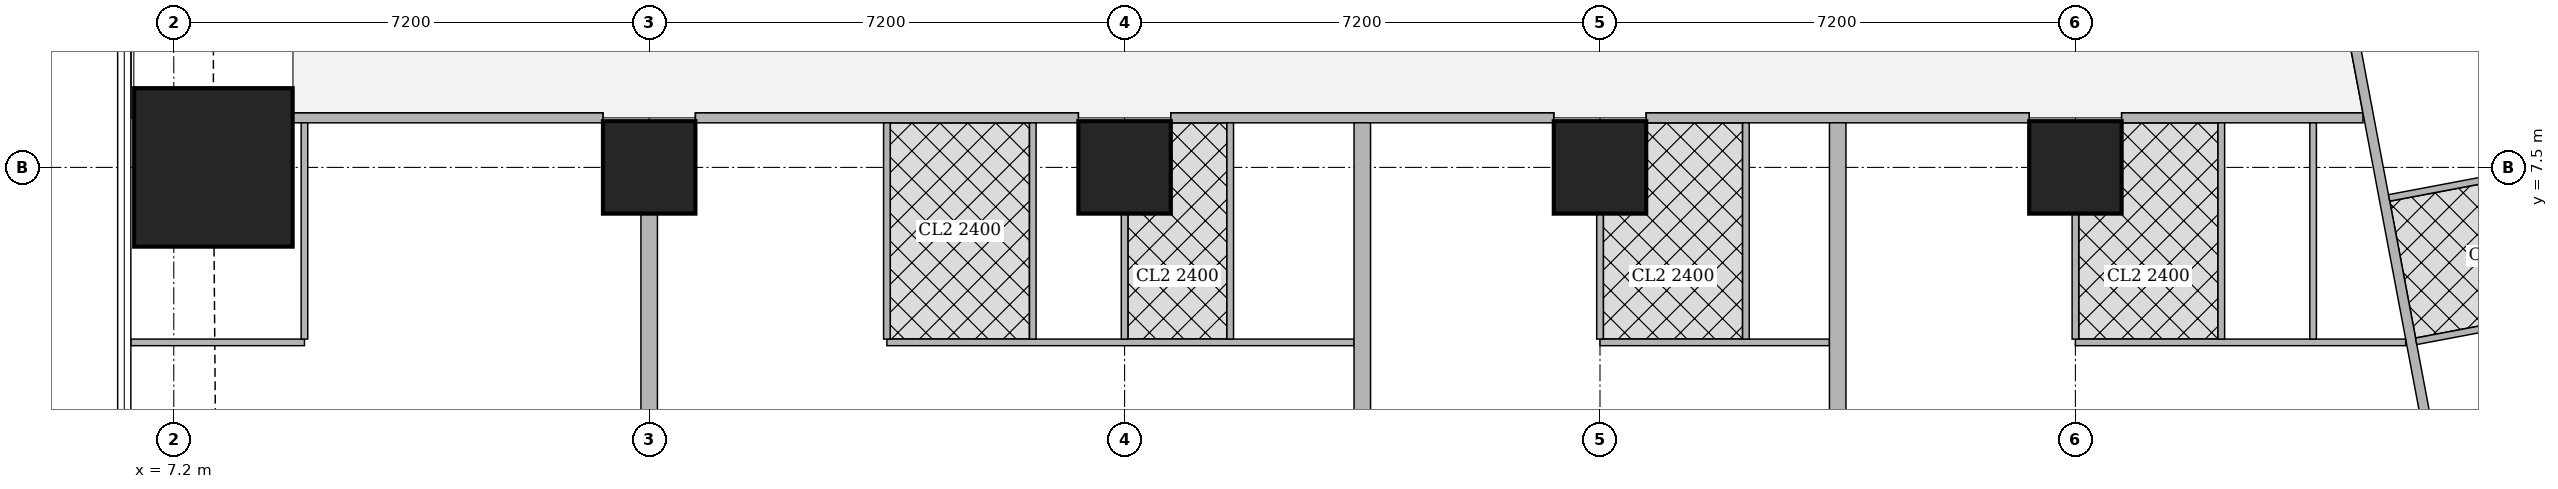
"""IFC4 building model, lengths in metres.
Left out: names, types, materials, properties, quantities, classifications, styles, units other than length and angle.
Written with IfcOpenShell. Run it as: python <this file> out.ifc"""

import sys

from ifc_helpers import new_model, si_unit, direction, frame, frame_2d, origin, origin_2d, place, context, subcontext, project, spatial, rectangle, extrude, element, fill, save


model = new_model("IFC4")
c1 = context("Model", 3, precision=1e-05, world=origin(), true_north=direction((0.0, 1.0)))
c2 = subcontext(c1, "Body", "Model", "MODEL_VIEW")
j1 = project(units=[si_unit("LENGTHUNIT", "METRE"), si_unit("PLANEANGLEUNIT", "RADIAN")], contexts=[c1])
p1 = place(None, origin())
s1 = spatial("IfcSite", under=j1, at=p1, CompositionType="ELEMENT")
p2 = place(p1, origin())
s2 = spatial("IfcBuilding", under=s1, at=p2, CompositionType="ELEMENT")
p3 = place(p2, frame((0.0, 0.0, 216.2)))
s3 = spatial("IfcBuildingStorey", under=s2, at=p3, CompositionType="ELEMENT", Elevation=216.2)
p4 = place(p3, frame((7.8, 7.5, 0.0), z_axis=(0.0, 0.0, 1.0), x_axis=(1.0, 0.0, 0.0)))
e1 = element("IfcColumn", 1, at=p4, inside=s3, PredefinedType="COLUMN", context=c2, shape_type="SweptSolid", body=[
    extrude(rectangle(XDim=2.4, YDim=2.4, at=origin_2d()), origin(), (0.0, 0.0, 1.0), 3.75),
])
for number, where, z_axis, x_axis in (
    (2, (14.4, 7.5, 0.0), (0.0, 0.0, 1.0), (1.0, 0.0, 0.0)),
    (3, (21.6, 7.5, 0.0), (0.0, 0.0, 1.0), (1.0, 0.0, 0.0)),
    (4, (28.8, 7.5, 0.0), (0.0, 0.0, 1.0), (1.0, 0.0, 0.0)),
    (5, (36.0, 7.5, 0.0), (0.0, 0.0, 1.0), (1.0, 0.0, 0.0)),
):
    element("IfcColumn", number, at=place(p3, frame(where, z_axis=z_axis, x_axis=x_axis)), inside=s3, PredefinedType="COLUMN", context=c2, shape_type="SweptSolid", body=[
        extrude(rectangle(XDim=1.4, YDim=1.4, at=origin_2d()), origin(), (0.0, 0.0, 1.0), 3.75),
    ])
p5 = place(p3, frame((40.355, 8.25, 0.0), z_axis=(0.0, 0.0, 1.0), x_axis=(-1.0, 0.0, 0.0)))
e6 = element("IfcWall", 6, at=p5, inside=s3, PredefinedType="SOLIDWALL", context=c2, shape_type="SweptSolid", body=[
    extrude(rectangle(XDim=3.654, YDim=0.15, at=frame_2d((1.827, 0.0))), origin(), (0.0, 0.0, 1.0), 3.5),
])
p6 = place(p3, frame((35.299, 8.25, 0.0), z_axis=(0.0, 0.0, 1.0), x_axis=(-1.0, 0.0, 0.0)))
e7 = element("IfcWall", 7, at=p6, inside=s3, PredefinedType="SOLIDWALL", context=c2, shape_type="SweptSolid", body=[
    extrude(rectangle(XDim=5.798, YDim=0.15, at=frame_2d((2.899, 0.0))), origin(), (0.0, 0.0, 1.0), 3.5),
])
p7 = place(p6, frame((0.728, 0.0, 0.0)))
e8 = element("IfcOpeningElement", 8, at=p7, cuts=e7, PredefinedType="OPENING", context=c2, shape_type="SweptSolid", body=[
    extrude(rectangle(XDim=1.0, YDim=2.1, at=frame_2d((0.5, 1.05))), frame((0.0, 0.085, 0.0), z_axis=(0.0, -1.0, 0.0), x_axis=(1.0, 0.0, 0.0)), (0.0, 0.0, 1.0), 0.17),
])
p8 = place(p3, frame((28.099, 8.25, 0.0), z_axis=(0.0, 0.0, 1.0), x_axis=(-1.0, 0.0, 0.0)))
e9 = element("IfcWall", 9, at=p8, inside=s3, PredefinedType="SOLIDWALL", context=c2, shape_type="SweptSolid", body=[
    extrude(rectangle(XDim=5.798, YDim=0.15, at=frame_2d((2.899, 0.0))), origin(), (0.0, 0.0, 1.0), 3.5),
])
p9 = place(p8, frame((0.799, 0.0, 0.0)))
e10 = element("IfcOpeningElement", 10, at=p9, cuts=e9, PredefinedType="OPENING", context=c2, shape_type="SweptSolid", body=[
    extrude(rectangle(XDim=1.0, YDim=2.1, at=frame_2d((0.5, 1.05))), frame((0.0, 0.085, 0.0), z_axis=(0.0, -1.0, 0.0), x_axis=(1.0, 0.0, 0.0)), (0.0, 0.0, 1.0), 0.17),
])
p10 = place(p3, frame((20.899, 8.25, 0.0), z_axis=(0.0, 0.0, 1.0), x_axis=(-1.0, 0.0, 0.0)))
e11 = element("IfcWall", 11, at=p10, inside=s3, PredefinedType="SOLIDWALL", context=c2, shape_type="SweptSolid", body=[
    extrude(rectangle(XDim=5.798, YDim=0.15, at=frame_2d((2.899, 0.0))), origin(), (0.0, 0.0, 1.0), 3.5),
])
p11 = place(p10, frame((3.999, 0.0, 0.0)))
e12 = element("IfcOpeningElement", 12, at=p11, cuts=e11, PredefinedType="OPENING", context=c2, shape_type="SweptSolid", body=[
    extrude(rectangle(XDim=1.0, YDim=2.1, at=frame_2d((0.5, 1.05))), frame((0.0, 0.085, 0.0), z_axis=(0.0, -1.0, 0.0), x_axis=(1.0, 0.0, 0.0)), (0.0, 0.0, 1.0), 0.17),
])
p12 = place(p3, frame((13.699, 8.25, 0.0), z_axis=(0.0, 0.0, 1.0), x_axis=(-1.0, 0.0, 0.0)))
e13 = element("IfcWall", 13, at=p12, inside=s3, PredefinedType="SOLIDWALL", context=c2, shape_type="SweptSolid", body=[
    extrude(rectangle(XDim=4.698, YDim=0.15, at=frame_2d((2.349, 0.0))), origin(), (0.0, 0.0, 1.0), 3.5),
])
p13 = place(p12, frame((3.345, 0.0, 0.0)))
e14 = element("IfcOpeningElement", 14, at=p13, cuts=e13, PredefinedType="OPENING", context=c2, shape_type="SweptSolid", body=[
    extrude(rectangle(XDim=1.0, YDim=2.1, at=frame_2d((0.5, 1.05))), frame((0.0, 0.085, 0.0), z_axis=(0.0, -1.0, 0.0), x_axis=(1.0, 0.0, 0.0)), (0.0, 0.0, 1.0), 0.17),
])
p14 = place(p3, frame((33.933, 42.73, 0.0), z_axis=(0.0, 0.0, 1.0), x_axis=(0.185595417643, -0.982626246825, 0.0)))
e15 = element("IfcWall", 15, at=p14, inside=s3, PredefinedType="SOLIDWALL", context=c2, shape_type="SweptSolid", body=[
    extrude(rectangle(XDim=41.051, YDim=0.15, at=frame_2d((20.525, 0.0))), origin(), (0.0, 0.0, 1.0), 2.5),
])
p15 = place(p14, frame((12.266, 0.0, 0.0)))
e16 = element("IfcOpeningElement", 16, at=p15, cuts=e15, PredefinedType="OPENING", context=c2, shape_type="SweptSolid", body=[
    extrude(rectangle(XDim=1.0, YDim=2.1, at=frame_2d((0.5, 1.05))), frame((0.0, 0.085, 0.0), z_axis=(0.0, -1.0, 0.0), x_axis=(1.0, 0.0, 0.0)), (0.0, 0.0, 1.0), 0.17),
])
p16 = place(p14, frame((16.082, 0.0, 0.0)))
e17 = element("IfcOpeningElement", 17, at=p16, cuts=e15, PredefinedType="OPENING", context=c2, shape_type="SweptSolid", body=[
    extrude(rectangle(XDim=1.0, YDim=2.1, at=frame_2d((0.5, 1.05))), frame((0.0, 0.085, 0.0), z_axis=(0.0, -1.0, 0.0), x_axis=(1.0, 0.0, 0.0)), (0.0, 0.0, 1.0), 0.17),
])
p17 = place(p14, frame((24.369, 0.0, 0.0)))
e18 = element("IfcOpeningElement", 18, at=p17, cuts=e15, PredefinedType="OPENING", context=c2, shape_type="SweptSolid", body=[
    extrude(rectangle(XDim=1.0, YDim=2.1, at=frame_2d((0.5, 1.05))), frame((0.0, 0.085, 0.0), z_axis=(0.0, -1.0, 0.0), x_axis=(1.0, 0.0, 0.0)), (0.0, 0.0, 1.0), 0.17),
])
p18 = place(p14, frame((30.862, 0.0, 0.0)))
e19 = element("IfcOpeningElement", 19, at=p18, cuts=e15, PredefinedType="OPENING", context=c2, shape_type="SweptSolid", body=[
    extrude(rectangle(XDim=1.0, YDim=2.1, at=frame_2d((0.5, 1.05))), frame((0.0, 0.085, 0.0), z_axis=(0.0, -1.0, 0.0), x_axis=(1.0, 0.0, 0.0)), (0.0, 0.0, 1.0), 0.17),
])
p19 = place(p3, frame((9.179, 4.85, 0.0), z_axis=(0.0, 0.0, 1.0), x_axis=(-1.0, 0.0, 0.0)))
e20 = element("IfcWall", 20, at=p19, inside=s3, PredefinedType="PARTITIONING", context=c2, shape_type="SweptSolid", body=[
    extrude(rectangle(XDim=2.629, YDim=0.1, at=frame_2d((1.314, 0.0))), origin(), (0.0, 0.0, 1.0), 2.05),
])
p20 = place(p3, frame((9.179, 4.9, 0.0), z_axis=(0.0, 0.0, 1.0), x_axis=(0.0, 1.0, 0.0)))
e21 = element("IfcWall", 21, at=p20, inside=s3, PredefinedType="PARTITIONING", context=c2, shape_type="SweptSolid", body=[
    extrude(rectangle(XDim=3.275, YDim=0.1, at=frame_2d((1.638, 0.0))), origin(), (0.0, 0.0, 1.0), 3.5),
])
p21 = place(p20, frame((0.15, 0.0, 0.0)))
e22 = element("IfcOpeningElement", 22, at=p21, cuts=e21, PredefinedType="OPENING", context=c2, shape_type="SweptSolid", body=[
    extrude(rectangle(XDim=0.9, YDim=2.1, at=frame_2d((0.45, 1.05))), frame((0.0, 0.06, 0.0), z_axis=(0.0, -1.0, 0.0), x_axis=(1.0, 0.0, 0.0)), (0.0, 0.0, 1.0), 0.12),
])
p22 = place(p3, frame((25.075, 4.85, 0.0), z_axis=(0.0, 0.0, 1.0), x_axis=(-1.0, 0.0, 0.0)))
e23 = element("IfcWall", 23, at=p22, inside=s3, PredefinedType="PARTITIONING", context=c2, shape_type="SweptSolid", body=[
    extrude(rectangle(XDim=7.075, YDim=0.1, at=frame_2d((3.538, 0.0))), origin(), (0.0, 0.0, 1.0), 3.5),
])
p23 = place(p22, frame((5.52, 0.0, 0.0)))
e24 = element("IfcOpeningElement", 24, at=p23, cuts=e23, PredefinedType="OPENING", context=c2, shape_type="SweptSolid", body=[
    extrude(rectangle(XDim=0.9, YDim=2.1, at=frame_2d((0.45, 1.05))), frame((0.0, 0.06, 0.0), z_axis=(0.0, -1.0, 0.0), x_axis=(1.0, 0.0, 0.0)), (0.0, 0.0, 1.0), 0.12),
])
p24 = place(p22, frame((2.225, 0.0, 0.0)))
e25 = element("IfcOpeningElement", 25, at=p24, cuts=e23, PredefinedType="OPENING", context=c2, shape_type="SweptSolid", body=[
    extrude(rectangle(XDim=0.9, YDim=2.1, at=frame_2d((0.45, 1.05))), frame((0.0, 0.06, 0.0), z_axis=(0.0, -1.0, 0.0), x_axis=(1.0, 0.0, 0.0)), (0.0, 0.0, 1.0), 0.12),
])
p25 = place(p22, frame((3.72, 0.0, 0.0)))
e26 = element("IfcOpeningElement", 26, at=p25, cuts=e23, PredefinedType="OPENING", context=c2, shape_type="SweptSolid", body=[
    extrude(rectangle(XDim=0.9, YDim=2.1, at=frame_2d((0.45, 1.05))), frame((0.0, 0.06, 0.0), z_axis=(0.0, -1.0, 0.0), x_axis=(1.0, 0.0, 0.0)), (0.0, 0.0, 1.0), 0.12),
])
p26 = place(p22, frame((0.425, 0.0, 0.0)))
e27 = element("IfcOpeningElement", 27, at=p26, cuts=e23, PredefinedType="OPENING", context=c2, shape_type="SweptSolid", body=[
    extrude(rectangle(XDim=0.9, YDim=2.1, at=frame_2d((0.45, 1.05))), frame((0.0, 0.06, 0.0), z_axis=(0.0, -1.0, 0.0), x_axis=(1.0, 0.0, 0.0)), (0.0, 0.0, 1.0), 0.12),
])
p27 = place(p3, frame((18.0, 4.9, 0.0), z_axis=(0.0, 0.0, 1.0), x_axis=(0.0, 1.0, 0.0)))
e28 = element("IfcWall", 28, at=p27, inside=s3, PredefinedType="PARTITIONING", context=c2, shape_type="SweptSolid", body=[
    extrude(rectangle(XDim=3.275, YDim=0.1, at=frame_2d((1.638, 0.0))), origin(), (0.0, 0.0, 1.0), 3.5),
])
p28 = place(p3, frame((21.6, 4.9, 0.0), z_axis=(0.0, 0.0, 1.0), x_axis=(0.0, 1.0, 0.0)))
e29 = element("IfcWall", 29, at=p28, inside=s3, PredefinedType="PARTITIONING", context=c2, shape_type="SweptSolid", body=[
    extrude(rectangle(XDim=1.899, YDim=0.1, at=frame_2d((0.95, 0.0))), origin(), (0.0, 0.0, 1.0), 3.5),
])
for number, where, z_axis, x_axis in (
    (30, (20.21, 4.9, 0.0), (0.0, 0.0, 1.0), (0.0, 1.0, 0.0)),
    (31, (23.2, 4.9, 0.0), (0.0, 0.0, 1.0), (0.0, 1.0, 0.0)),
):
    element("IfcWall", number, at=place(p3, frame(where, z_axis=z_axis, x_axis=x_axis)), inside=s3, PredefinedType="PARTITIONING", context=c2, shape_type="SweptSolid", body=[
        extrude(rectangle(XDim=3.275, YDim=0.1, at=frame_2d((1.638, 0.0))), origin(), (0.0, 0.0, 1.0), 3.5),
    ])
p29 = place(p3, frame((14.4, 3.65, 0.0), z_axis=(0.0, 0.0, 1.0), x_axis=(0.0, 1.0, 0.0)))
e32 = element("IfcWall", 32, at=p29, inside=s3, PredefinedType="SOLIDWALL", context=c2, shape_type="SweptSolid", body=[
    extrude(rectangle(XDim=3.149, YDim=0.25, at=frame_2d((1.575, 0.0))), origin(), (0.0, 0.0, 1.0), 3.5),
])
p30 = place(p3, frame((32.275, 4.85, 0.0), z_axis=(0.0, 0.0, 1.0), x_axis=(-1.0, 0.0, 0.0)))
e33 = element("IfcWall", 33, at=p30, inside=s3, PredefinedType="PARTITIONING", context=c2, shape_type="SweptSolid", body=[
    extrude(rectangle(XDim=3.475, YDim=0.1, at=frame_2d((1.737, 0.0))), origin(), (0.0, 0.0, 1.0), 3.5),
])
p31 = place(p30, frame((1.92, 0.0, 0.0)))
e34 = element("IfcOpeningElement", 34, at=p31, cuts=e33, PredefinedType="OPENING", context=c2, shape_type="SweptSolid", body=[
    extrude(rectangle(XDim=0.9, YDim=2.1, at=frame_2d((0.45, 1.05))), frame((0.0, 0.06, 0.0), z_axis=(0.0, -1.0, 0.0), x_axis=(1.0, 0.0, 0.0)), (0.0, 0.0, 1.0), 0.12),
])
p32 = place(p30, frame((0.15, 0.0, 0.0)))
e35 = element("IfcOpeningElement", 35, at=p32, cuts=e33, PredefinedType="OPENING", context=c2, shape_type="SweptSolid", body=[
    extrude(rectangle(XDim=0.9, YDim=2.1, at=frame_2d((0.45, 1.05))), frame((0.0, 0.06, 0.0), z_axis=(0.0, -1.0, 0.0), x_axis=(1.0, 0.0, 0.0)), (0.0, 0.0, 1.0), 0.12),
])
p33 = place(p3, frame((28.8, 4.9, 0.0), z_axis=(0.0, 0.0, 1.0), x_axis=(0.0, 1.0, 0.0)))
e36 = element("IfcWall", 36, at=p33, inside=s3, PredefinedType="PARTITIONING", context=c2, shape_type="SweptSolid", body=[
    extrude(rectangle(XDim=1.899, YDim=0.1, at=frame_2d((0.95, 0.0))), origin(), (0.0, 0.0, 1.0), 3.5),
])
p34 = place(p3, frame((31.01, 4.9, 0.0), z_axis=(0.0, 0.0, 1.0), x_axis=(0.0, 1.0, 0.0)))
e37 = element("IfcWall", 37, at=p34, inside=s3, PredefinedType="PARTITIONING", context=c2, shape_type="SweptSolid", body=[
    extrude(rectangle(XDim=3.275, YDim=0.1, at=frame_2d((1.638, 0.0))), origin(), (0.0, 0.0, 1.0), 3.5),
])
p35 = place(p3, frame((25.2, 3.65, 0.0), z_axis=(0.0, 0.0, 1.0), x_axis=(0.0, 1.0, 0.0)))
e38 = element("IfcWall", 38, at=p35, inside=s3, PredefinedType="SOLIDWALL", context=c2, shape_type="SweptSolid", body=[
    extrude(rectangle(XDim=4.525, YDim=0.25, at=frame_2d((2.263, 0.0))), origin(), (0.0, 0.0, 1.0), 3.5),
])
p36 = place(p3, frame((41.002, 4.85, 0.0), z_axis=(0.0, 0.0, 1.0), x_axis=(-1.0, 0.0, 0.0)))
e39 = element("IfcWall", 39, at=p36, inside=s3, PredefinedType="PARTITIONING", context=c2, shape_type="SweptSolid", body=[
    extrude(rectangle(XDim=5.002, YDim=0.1, at=frame_2d((2.501, 0.0))), origin(), (0.0, 0.0, 1.0), 3.5),
])
p37 = place(p36, frame((3.447, 0.0, 0.0)))
e40 = element("IfcOpeningElement", 40, at=p37, cuts=e39, PredefinedType="OPENING", context=c2, shape_type="SweptSolid", body=[
    extrude(rectangle(XDim=0.9, YDim=2.1, at=frame_2d((0.45, 1.05))), frame((0.0, 0.06, 0.0), z_axis=(0.0, -1.0, 0.0), x_axis=(1.0, 0.0, 0.0)), (0.0, 0.0, 1.0), 0.12),
])
p38 = place(p36, frame((0.15, 0.0, 0.0)))
e41 = element("IfcOpeningElement", 41, at=p38, cuts=e39, PredefinedType="OPENING", context=c2, shape_type="SweptSolid", body=[
    extrude(rectangle(XDim=0.9, YDim=2.1, at=frame_2d((0.45, 1.05))), frame((0.0, 0.06, 0.0), z_axis=(0.0, -1.0, 0.0), x_axis=(1.0, 0.0, 0.0)), (0.0, 0.0, 1.0), 0.12),
])
p39 = place(p36, frame((1.647, 0.0, 0.0)))
e42 = element("IfcOpeningElement", 42, at=p39, cuts=e39, PredefinedType="OPENING", context=c2, shape_type="SweptSolid", body=[
    extrude(rectangle(XDim=0.9, YDim=2.1, at=frame_2d((0.45, 1.05))), frame((0.0, 0.06, 0.0), z_axis=(0.0, -1.0, 0.0), x_axis=(1.0, 0.0, 0.0)), (0.0, 0.0, 1.0), 0.12),
])
p40 = place(p3, frame((36.0, 4.9, 0.0), z_axis=(0.0, 0.0, 1.0), x_axis=(0.0, 1.0, 0.0)))
e43 = element("IfcWall", 43, at=p40, inside=s3, PredefinedType="PARTITIONING", context=c2, shape_type="SweptSolid", body=[
    extrude(rectangle(XDim=1.899, YDim=0.1, at=frame_2d((0.95, 0.0))), origin(), (0.0, 0.0, 1.0), 3.5),
])
for number, where, z_axis, x_axis in (
    (44, (39.6, 4.9, 0.0), (0.0, 0.0, 1.0), (0.0, 1.0, 0.0)),
    (45, (38.21, 4.9, 0.0), (0.0, 0.0, 1.0), (0.0, 1.0, 0.0)),
):
    element("IfcWall", number, at=place(p3, frame(where, z_axis=z_axis, x_axis=x_axis)), inside=s3, PredefinedType="PARTITIONING", context=c2, shape_type="SweptSolid", body=[
        extrude(rectangle(XDim=3.275, YDim=0.1, at=frame_2d((1.638, 0.0))), origin(), (0.0, 0.0, 1.0), 3.5),
    ])
p41 = place(p3, frame((32.4, 3.65, 0.0), z_axis=(0.0, 0.0, 1.0), x_axis=(0.0, 1.0, 0.0)))
e46 = element("IfcWall", 46, at=p41, inside=s3, PredefinedType="SOLIDWALL", context=c2, shape_type="SweptSolid", body=[
    extrude(rectangle(XDim=4.525, YDim=0.25, at=frame_2d((2.263, 0.0))), origin(), (0.0, 0.0, 1.0), 3.5),
])
p42 = place(p3, frame((42.49, 7.367, 0.0), z_axis=(0.0, 0.0, 1.0), x_axis=(-0.982585223885, -0.185812480215, 0.0)))
e47 = element("IfcWall", 47, at=p42, inside=s3, PredefinedType="PARTITIONING", context=c2, shape_type="SweptSolid", body=[
    extrude(rectangle(XDim=1.77, YDim=0.1, at=frame_2d((0.885, 0.0))), origin(), (0.0, 0.0, 1.0), 3.5),
])
p43 = place(p3, frame((44.379, 5.474, 0.0), z_axis=(0.0, 0.0, 1.0), x_axis=(-0.982607026909, -0.185697147715, 0.0)))
e48 = element("IfcWall", 48, at=p43, inside=s3, PredefinedType="PARTITIONING", context=c2, shape_type="SweptSolid", body=[
    extrude(rectangle(XDim=3.275, YDim=0.1, at=frame_2d((1.637, 0.0))), origin(), (0.0, 0.0, 1.0), 3.5),
])
p44 = place(p21, origin())
e49 = element("IfcDoor", 49, at=p44, inside=s3, OperationType="SINGLE_SWING_LEFT", PredefinedType="DOOR", context=c2, shape_type="SweptSolid", body=[
    extrude(rectangle(XDim=0.9, YDim=2.1, at=frame_2d((0.45, 1.05))), frame((0.0, 0.025, 0.0), z_axis=(0.0, -1.0, 0.0), x_axis=(1.0, 0.0, 0.0)), (0.0, 0.0, 1.0), 0.05),
])
fill(e22, e49)
p45 = place(p13, origin())
e50 = element("IfcDoor", 50, at=p45, inside=s3, OperationType="SINGLE_SWING_LEFT", PredefinedType="DOOR", context=c2, shape_type="SweptSolid", body=[
    extrude(rectangle(XDim=1.0, YDim=2.1, at=frame_2d((0.5, 1.05))), frame((0.0, 0.025, 0.0), z_axis=(0.0, -1.0, 0.0), x_axis=(1.0, 0.0, 0.0)), (0.0, 0.0, 1.0), 0.05),
])
fill(e14, e50)
p46 = place(p23, origin())
e51 = element("IfcDoor", 51, at=p46, inside=s3, OperationType="SINGLE_SWING_LEFT", PredefinedType="DOOR", context=c2, shape_type="SweptSolid", body=[
    extrude(rectangle(XDim=0.9, YDim=2.1, at=frame_2d((0.45, 1.05))), frame((0.0, 0.025, 0.0), z_axis=(0.0, -1.0, 0.0), x_axis=(1.0, 0.0, 0.0)), (0.0, 0.0, 1.0), 0.05),
])
fill(e24, e51)
p47 = place(p24, origin())
e52 = element("IfcDoor", 52, at=p47, inside=s3, OperationType="SINGLE_SWING_RIGHT", PredefinedType="DOOR", context=c2, shape_type="SweptSolid", body=[
    extrude(rectangle(XDim=0.9, YDim=2.1, at=frame_2d((0.45, 1.05))), frame((0.0, 0.025, 0.0), z_axis=(0.0, -1.0, 0.0), x_axis=(1.0, 0.0, 0.0)), (0.0, 0.0, 1.0), 0.05),
])
fill(e25, e52)
p48 = place(p25, origin())
e53 = element("IfcDoor", 53, at=p48, inside=s3, OperationType="SINGLE_SWING_RIGHT", PredefinedType="DOOR", context=c2, shape_type="SweptSolid", body=[
    extrude(rectangle(XDim=0.9, YDim=2.1, at=frame_2d((0.45, 1.05))), frame((0.0, 0.025, 0.0), z_axis=(0.0, -1.0, 0.0), x_axis=(1.0, 0.0, 0.0)), (0.0, 0.0, 1.0), 0.05),
])
fill(e26, e53)
p49 = place(p26, origin())
e54 = element("IfcDoor", 54, at=p49, inside=s3, OperationType="SINGLE_SWING_RIGHT", PredefinedType="DOOR", context=c2, shape_type="SweptSolid", body=[
    extrude(rectangle(XDim=0.9, YDim=2.1, at=frame_2d((0.45, 1.05))), frame((0.0, 0.025, 0.0), z_axis=(0.0, -1.0, 0.0), x_axis=(1.0, 0.0, 0.0)), (0.0, 0.0, 1.0), 0.05),
])
fill(e27, e54)
p50 = place(p11, origin())
e55 = element("IfcDoor", 55, at=p50, inside=s3, OperationType="SINGLE_SWING_RIGHT", PredefinedType="DOOR", context=c2, shape_type="SweptSolid", body=[
    extrude(rectangle(XDim=1.0, YDim=2.1, at=frame_2d((0.5, 1.05))), frame((0.0, 0.025, 0.0), z_axis=(0.0, -1.0, 0.0), x_axis=(1.0, 0.0, 0.0)), (0.0, 0.0, 1.0), 0.05),
])
fill(e12, e55)
p51 = place(p31, origin())
e56 = element("IfcDoor", 56, at=p51, inside=s3, OperationType="SINGLE_SWING_LEFT", PredefinedType="DOOR", context=c2, shape_type="SweptSolid", body=[
    extrude(rectangle(XDim=0.9, YDim=2.1, at=frame_2d((0.45, 1.05))), frame((0.0, 0.025, 0.0), z_axis=(0.0, -1.0, 0.0), x_axis=(1.0, 0.0, 0.0)), (0.0, 0.0, 1.0), 0.05),
])
fill(e34, e56)
p52 = place(p32, origin())
e57 = element("IfcDoor", 57, at=p52, inside=s3, OperationType="SINGLE_SWING_RIGHT", PredefinedType="DOOR", context=c2, shape_type="SweptSolid", body=[
    extrude(rectangle(XDim=0.9, YDim=2.1, at=frame_2d((0.45, 1.05))), frame((0.0, 0.025, 0.0), z_axis=(0.0, -1.0, 0.0), x_axis=(1.0, 0.0, 0.0)), (0.0, 0.0, 1.0), 0.05),
])
fill(e35, e57)
p53 = place(p9, origin())
e58 = element("IfcDoor", 58, at=p53, inside=s3, OperationType="SINGLE_SWING_LEFT", PredefinedType="DOOR", context=c2, shape_type="SweptSolid", body=[
    extrude(rectangle(XDim=1.0, YDim=2.1, at=frame_2d((0.5, 1.05))), frame((0.0, 0.025, 0.0), z_axis=(0.0, -1.0, 0.0), x_axis=(1.0, 0.0, 0.0)), (0.0, 0.0, 1.0), 0.05),
])
fill(e10, e58)
p54 = place(p37, origin())
e59 = element("IfcDoor", 59, at=p54, inside=s3, OperationType="SINGLE_SWING_LEFT", PredefinedType="DOOR", context=c2, shape_type="SweptSolid", body=[
    extrude(rectangle(XDim=0.9, YDim=2.1, at=frame_2d((0.45, 1.05))), frame((0.0, 0.025, 0.0), z_axis=(0.0, -1.0, 0.0), x_axis=(1.0, 0.0, 0.0)), (0.0, 0.0, 1.0), 0.05),
])
fill(e40, e59)
p55 = place(p38, origin())
e60 = element("IfcDoor", 60, at=p55, inside=s3, OperationType="SINGLE_SWING_RIGHT", PredefinedType="DOOR", context=c2, shape_type="SweptSolid", body=[
    extrude(rectangle(XDim=0.9, YDim=2.1, at=frame_2d((0.45, 1.05))), frame((0.0, 0.025, 0.0), z_axis=(0.0, -1.0, 0.0), x_axis=(1.0, 0.0, 0.0)), (0.0, 0.0, 1.0), 0.05),
])
fill(e41, e60)
p56 = place(p39, origin())
e61 = element("IfcDoor", 61, at=p56, inside=s3, OperationType="SINGLE_SWING_RIGHT", PredefinedType="DOOR", context=c2, shape_type="SweptSolid", body=[
    extrude(rectangle(XDim=0.9, YDim=2.1, at=frame_2d((0.45, 1.05))), frame((0.0, 0.025, 0.0), z_axis=(0.0, -1.0, 0.0), x_axis=(1.0, 0.0, 0.0)), (0.0, 0.0, 1.0), 0.05),
])
fill(e42, e61)
p57 = place(p7, origin())
e62 = element("IfcDoor", 62, at=p57, inside=s3, OperationType="SINGLE_SWING_LEFT", PredefinedType="DOOR", context=c2, shape_type="SweptSolid", body=[
    extrude(rectangle(XDim=1.0, YDim=2.1, at=frame_2d((0.5, 1.05))), frame((0.0, 0.025, 0.0), z_axis=(0.0, -1.0, 0.0), x_axis=(1.0, 0.0, 0.0)), (0.0, 0.0, 1.0), 0.05),
])
fill(e8, e62)
save(model, sys.argv[1])
